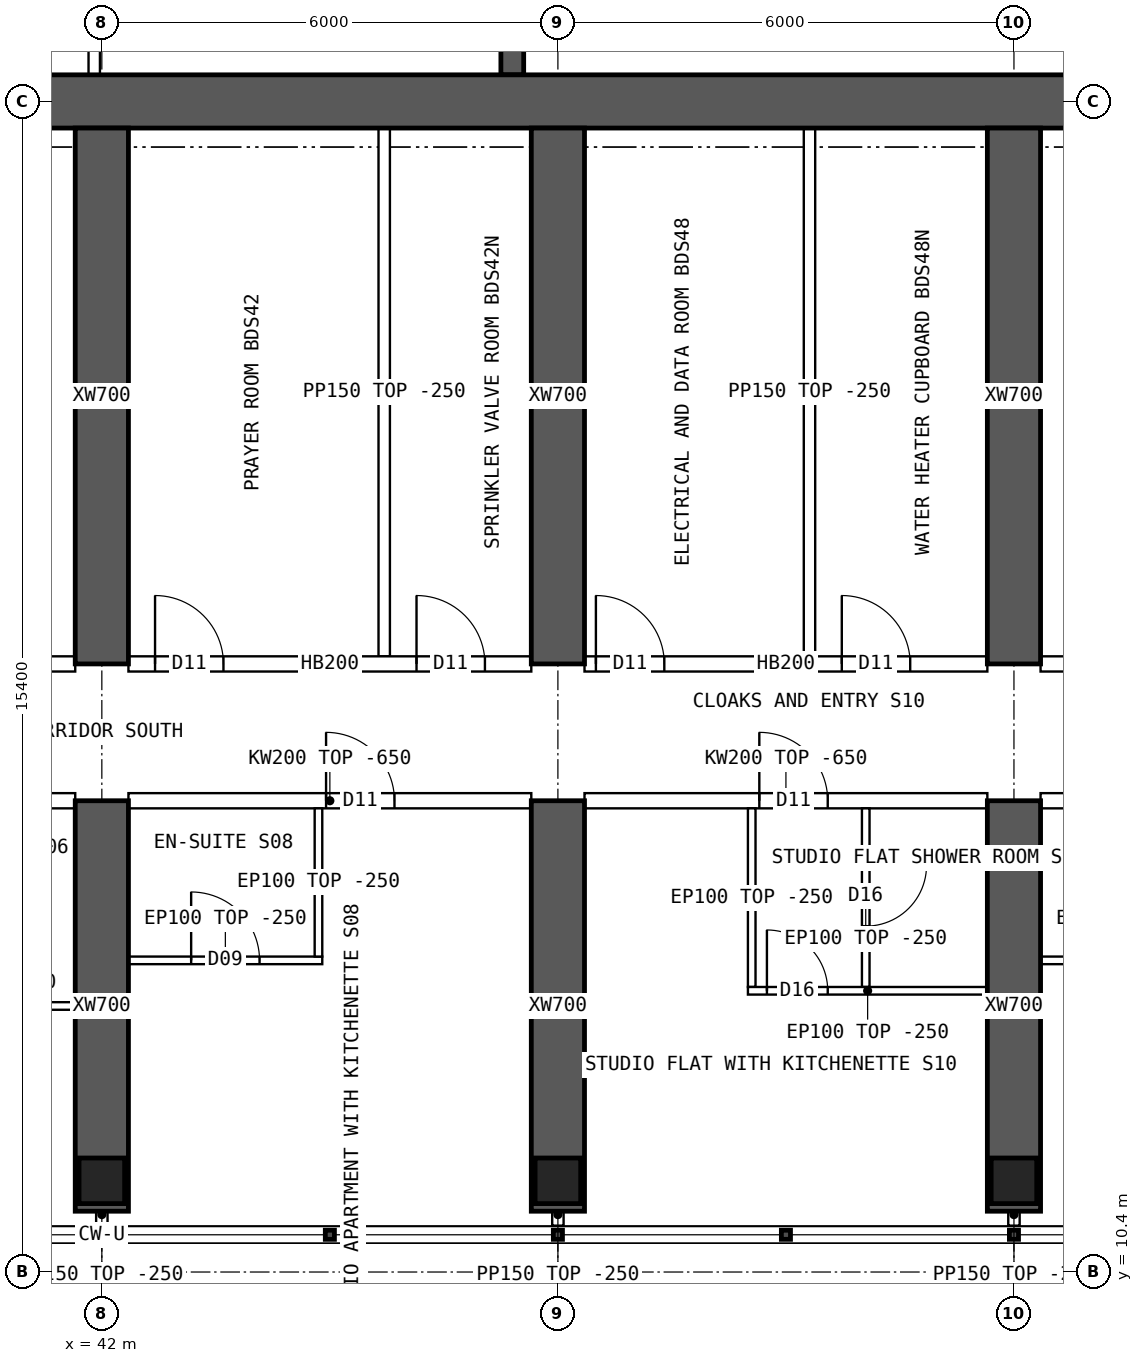
"""IFC4 building model, lengths in metres.
Left out: names, types, materials, properties, quantities, classifications, styles, units other than length and angle.
Written with IfcOpenShell. Run it as: python <this file> out.ifc"""

import sys

from ifc_helpers import new_model, si_unit, direction, frame, frame_2d, origin, origin_2d, place, context, subcontext, project, spatial, polyline, rectangle, hollow_rectangle, outline, extrude, element, fill, save


model = new_model("IFC4")
c1 = context("Model", 3, precision=1e-05, world=origin(), true_north=direction((0.0, 1.0)))
c2 = subcontext(c1, "Body", "Model", "MODEL_VIEW")
j1 = project(units=[si_unit("LENGTHUNIT", "METRE"), si_unit("PLANEANGLEUNIT", "RADIAN")], contexts=[c1])
p1 = place(None, origin())
s1 = spatial("IfcSite", under=j1, at=p1, CompositionType="ELEMENT")
p2 = place(p1, origin())
s2 = spatial("IfcBuilding", under=s1, at=p2, CompositionType="ELEMENT")
p3 = place(p2, frame((0.0, 0.0, 231.55)))
s3 = spatial("IfcBuildingStorey", under=s2, at=p3, CompositionType="ELEMENT", Elevation=231.55)
for number, where, z_axis, x_axis in (
    (1, (42.0, 11.6, 0.0), (0.0, 0.0, 1.0), (1.0, 0.0, 0.0)),
    (2, (48.0, 11.6, 0.0), (0.0, 0.0, 1.0), (1.0, 0.0, 0.0)),
    (3, (54.0, 11.6, 0.0), (0.0, 0.0, 1.0), (1.0, 0.0, 0.0)),
):
    element("IfcColumn", number, at=place(p3, frame(where, z_axis=z_axis, x_axis=x_axis)), inside=s3, PredefinedType="COLUMN", context=c2, shape_type="SweptSolid", body=[
        extrude(hollow_rectangle(XDim=0.6, YDim=0.6, WallThickness=0.06, at=origin_2d()), origin(), (0.0, 0.0, 1.0), 3.75),
    ])
p4 = place(p3, frame((18.0, 25.8, 0.0), z_axis=(0.0, 0.0, 1.0), x_axis=(1.0, 0.0, 0.0)))
e4 = element("IfcWall", 4, at=p4, inside=s3, PredefinedType="SHEAR", context=c2, shape_type="SweptSolid", body=[
    extrude(rectangle(XDim=48.0, YDim=0.7, at=frame_2d((24.0, 0.0))), origin(), (0.0, 0.0, 1.0), 3.75),
])
p5 = place(p3, frame((47.4, 26.15, 0.0), z_axis=(0.0, 0.0, 1.0), x_axis=(0.0, 1.0, 0.0)))
e5 = element("IfcWall", 5, at=p5, inside=s3, PredefinedType="SHEAR", context=c2, shape_type="SweptSolid", body=[
    extrude(rectangle(XDim=4.1, YDim=0.3, at=frame_2d((2.05, 0.0))), origin(), (0.0, 0.0, 1.0), 3.75),
])
p6 = place(p3, frame((42.0, 11.2, 0.0), z_axis=(0.0, 0.0, 1.0), x_axis=(0.0, 1.0, 0.0)))
e6 = element("IfcWall", 6, at=p6, inside=s3, PredefinedType="SHEAR", context=c2, shape_type="SweptSolid", body=[
    extrude(rectangle(XDim=5.4, YDim=0.7, at=frame_2d((2.7, 0.0))), origin(), (0.0, 0.0, 1.0), 3.75),
])
p7 = place(p3, frame((42.0, 18.4, 0.0), z_axis=(0.0, 0.0, 1.0), x_axis=(0.0, 1.0, 0.0)))
e7 = element("IfcWall", 7, at=p7, inside=s3, PredefinedType="SHEAR", context=c2, shape_type="SweptSolid", body=[
    extrude(rectangle(XDim=7.05, YDim=0.7, at=frame_2d((3.525, 0.0))), origin(), (0.0, 0.0, 1.0), 3.75),
])
p8 = place(p3, frame((48.0, 11.2, 0.0), z_axis=(0.0, 0.0, 1.0), x_axis=(0.0, 1.0, 0.0)))
e8 = element("IfcWall", 8, at=p8, inside=s3, PredefinedType="SHEAR", context=c2, shape_type="SweptSolid", body=[
    extrude(rectangle(XDim=5.4, YDim=0.7, at=frame_2d((2.7, 0.0))), origin(), (0.0, 0.0, 1.0), 3.75),
])
p9 = place(p3, frame((48.0, 18.4, 0.0), z_axis=(0.0, 0.0, 1.0), x_axis=(0.0, 1.0, 0.0)))
e9 = element("IfcWall", 9, at=p9, inside=s3, PredefinedType="SHEAR", context=c2, shape_type="SweptSolid", body=[
    extrude(rectangle(XDim=7.05, YDim=0.7, at=frame_2d((3.525, 0.0))), origin(), (0.0, 0.0, 1.0), 3.75),
])
p10 = place(p3, frame((54.0, 11.2, 0.0), z_axis=(0.0, 0.0, 1.0), x_axis=(0.0, 1.0, 0.0)))
e10 = element("IfcWall", 10, at=p10, inside=s3, PredefinedType="SHEAR", context=c2, shape_type="SweptSolid", body=[
    extrude(rectangle(XDim=5.4, YDim=0.7, at=frame_2d((2.7, 0.0))), origin(), (0.0, 0.0, 1.0), 3.75),
])
p11 = place(p3, frame((54.0, 18.4, 0.0), z_axis=(0.0, 0.0, 1.0), x_axis=(0.0, 1.0, 0.0)))
e11 = element("IfcWall", 11, at=p11, inside=s3, PredefinedType="SHEAR", context=c2, shape_type="SweptSolid", body=[
    extrude(rectangle(XDim=7.05, YDim=0.7, at=frame_2d((3.525, 0.0))), origin(), (0.0, 0.0, 1.0), 3.75),
])
p12 = place(p3, frame((41.9, 26.15, 0.0), z_axis=(0.0, 0.0, 1.0), x_axis=(0.0, 1.0, 0.0)))
e12 = element("IfcWall", 12, at=p12, inside=s3, PredefinedType="SOLIDWALL", context=c2, shape_type="SweptSolid", body=[
    extrude(rectangle(XDim=4.1, YDim=0.15, at=frame_2d((2.05, 0.0))), origin(), (0.0, 0.0, 1.0), 3.5),
])
p13 = place(p3, frame((36.35, 16.6, 0.0), z_axis=(0.0, 0.0, 1.0), x_axis=(1.0, 0.0, 0.0)))
e13 = element("IfcWall", 13, at=p13, inside=s3, PredefinedType="SOLIDWALL", context=c2, shape_type="SweptSolid", body=[
    extrude(outline(polyline([(0.0, 0.0), (5.3, 0.0), (5.3, 3.1), (0.0, 3.1), (0.0, 0.0)])), frame((0.0, 0.1, 0.0), z_axis=(0.0, -1.0, 0.0), x_axis=(1.0, 0.0, 0.0)), (0.0, 0.0, 1.0), 0.2),
])
p14 = place(p13, frame((0.3, 0.0, 0.0)))
e14 = element("IfcOpeningElement", 14, at=p14, cuts=e13, PredefinedType="OPENING", context=c2, shape_type="SweptSolid", body=[
    extrude(rectangle(XDim=1.0, YDim=2.1, at=frame_2d((0.5, 1.05))), frame((0.0, 0.11, 0.0), z_axis=(0.0, -1.0, 0.0), x_axis=(1.0, 0.0, 0.0)), (0.0, 0.0, 1.0), 0.22),
])
p15 = place(p3, frame((36.35, 18.4, 0.0), z_axis=(0.0, 0.0, 1.0), x_axis=(1.0, 0.0, 0.0)))
e15 = element("IfcWall", 15, at=p15, inside=s3, PredefinedType="SOLIDWALL", context=c2, shape_type="SweptSolid", body=[
    extrude(rectangle(XDim=5.3, YDim=0.2, at=frame_2d((2.65, 0.0))), origin(), (0.0, 0.0, 1.0), 3.5),
])
p16 = place(p15, frame((0.525, 0.0, 0.0)))
e16 = element("IfcOpeningElement", 16, at=p16, cuts=e15, PredefinedType="OPENING", context=c2, shape_type="SweptSolid", body=[
    extrude(rectangle(XDim=1.0, YDim=2.1, at=frame_2d((0.5, 1.05))), frame((0.0, 0.11, 0.0), z_axis=(0.0, -1.0, 0.0), x_axis=(1.0, 0.0, 0.0)), (0.0, 0.0, 1.0), 0.22),
])
p17 = place(p3, frame((42.35, 16.6, 0.0), z_axis=(0.0, 0.0, 1.0), x_axis=(1.0, 0.0, 0.0)))
e17 = element("IfcWall", 17, at=p17, inside=s3, PredefinedType="SOLIDWALL", context=c2, shape_type="SweptSolid", body=[
    extrude(outline(polyline([(0.0, 0.0), (5.3, 0.0), (5.3, 3.1), (0.0, 3.1), (0.0, 0.0)])), frame((0.0, 0.1, 0.0), z_axis=(0.0, -1.0, 0.0), x_axis=(1.0, 0.0, 0.0)), (0.0, 0.0, 1.0), 0.2),
])
p18 = place(p17, frame((2.6, 0.0, 0.0)))
e18 = element("IfcOpeningElement", 18, at=p18, cuts=e17, PredefinedType="OPENING", context=c2, shape_type="SweptSolid", body=[
    extrude(rectangle(XDim=0.9, YDim=2.1, at=frame_2d((0.45, 1.05))), frame((0.0, 0.11, 0.0), z_axis=(0.0, -1.0, 0.0), x_axis=(1.0, 0.0, 0.0)), (0.0, 0.0, 1.0), 0.22),
])
p19 = place(p3, frame((42.35, 18.4, 0.0), z_axis=(0.0, 0.0, 1.0), x_axis=(1.0, 0.0, 0.0)))
e19 = element("IfcWall", 19, at=p19, inside=s3, PredefinedType="SOLIDWALL", context=c2, shape_type="SweptSolid", body=[
    extrude(rectangle(XDim=5.3, YDim=0.2, at=frame_2d((2.65, 0.0))), origin(), (0.0, 0.0, 1.0), 3.5),
])
p20 = place(p19, frame((0.35, 0.0, 0.0)))
e20 = element("IfcOpeningElement", 20, at=p20, cuts=e19, PredefinedType="OPENING", context=c2, shape_type="SweptSolid", body=[
    extrude(rectangle(XDim=0.9, YDim=2.1, at=frame_2d((0.45, 1.05))), frame((0.0, 0.11, 0.0), z_axis=(0.0, -1.0, 0.0), x_axis=(1.0, 0.0, 0.0)), (0.0, 0.0, 1.0), 0.22),
])
p21 = place(p19, frame((3.79, 0.0, 0.0)))
e21 = element("IfcOpeningElement", 21, at=p21, cuts=e19, PredefinedType="OPENING", context=c2, shape_type="SweptSolid", body=[
    extrude(rectangle(XDim=0.9, YDim=2.1, at=frame_2d((0.45, 1.05))), frame((0.0, 0.11, 0.0), z_axis=(0.0, -1.0, 0.0), x_axis=(1.0, 0.0, 0.0)), (0.0, 0.0, 1.0), 0.22),
])
p22 = place(p3, frame((48.35, 16.6, 0.0), z_axis=(0.0, 0.0, 1.0), x_axis=(1.0, 0.0, 0.0)))
e22 = element("IfcWall", 22, at=p22, inside=s3, PredefinedType="SOLIDWALL", context=c2, shape_type="SweptSolid", body=[
    extrude(outline(polyline([(0.0, 0.0), (5.3, 0.0), (5.3, 3.1), (0.0, 3.1), (0.0, 0.0)])), frame((0.0, 0.1, 0.0), z_axis=(0.0, -1.0, 0.0), x_axis=(1.0, 0.0, 0.0)), (0.0, 0.0, 1.0), 0.2),
])
p23 = place(p22, frame((2.3, 0.0, 0.0)))
e23 = element("IfcOpeningElement", 23, at=p23, cuts=e22, PredefinedType="OPENING", context=c2, shape_type="SweptSolid", body=[
    extrude(rectangle(XDim=0.9, YDim=2.1, at=frame_2d((0.45, 1.05))), frame((0.0, 0.11, 0.0), z_axis=(0.0, -1.0, 0.0), x_axis=(1.0, 0.0, 0.0)), (0.0, 0.0, 1.0), 0.22),
])
p24 = place(p3, frame((48.35, 18.4, 0.0), z_axis=(0.0, 0.0, 1.0), x_axis=(1.0, 0.0, 0.0)))
e24 = element("IfcWall", 24, at=p24, inside=s3, PredefinedType="SOLIDWALL", context=c2, shape_type="SweptSolid", body=[
    extrude(rectangle(XDim=5.3, YDim=0.2, at=frame_2d((2.65, 0.0))), origin(), (0.0, 0.0, 1.0), 3.5),
])
p25 = place(p24, frame((0.15, 0.0, 0.0)))
e25 = element("IfcOpeningElement", 25, at=p25, cuts=e24, PredefinedType="OPENING", context=c2, shape_type="SweptSolid", body=[
    extrude(rectangle(XDim=0.9, YDim=2.1, at=frame_2d((0.45, 1.05))), frame((0.0, 0.11, 0.0), z_axis=(0.0, -1.0, 0.0), x_axis=(1.0, 0.0, 0.0)), (0.0, 0.0, 1.0), 0.22),
])
p26 = place(p24, frame((3.385, 0.0, 0.0)))
e26 = element("IfcOpeningElement", 26, at=p26, cuts=e24, PredefinedType="OPENING", context=c2, shape_type="SweptSolid", body=[
    extrude(rectangle(XDim=0.9, YDim=2.1, at=frame_2d((0.45, 1.05))), frame((0.0, 0.11, 0.0), z_axis=(0.0, -1.0, 0.0), x_axis=(1.0, 0.0, 0.0)), (0.0, 0.0, 1.0), 0.22),
])
p27 = place(p3, frame((54.35, 16.6, 0.0), z_axis=(0.0, 0.0, 1.0), x_axis=(1.0, 0.0, 0.0)))
e27 = element("IfcWall", 27, at=p27, inside=s3, PredefinedType="SOLIDWALL", context=c2, shape_type="SweptSolid", body=[
    extrude(outline(polyline([(0.0, 0.0), (5.3, 0.0), (5.3, 3.1), (0.0, 3.1), (0.0, 0.0)])), frame((0.0, 0.1, 0.0), z_axis=(0.0, -1.0, 0.0), x_axis=(1.0, 0.0, 0.0)), (0.0, 0.0, 1.0), 0.2),
])
p28 = place(p27, frame((2.6, 0.0, 0.0)))
e28 = element("IfcOpeningElement", 28, at=p28, cuts=e27, PredefinedType="OPENING", context=c2, shape_type="SweptSolid", body=[
    extrude(rectangle(XDim=0.9, YDim=2.1, at=frame_2d((0.45, 1.05))), frame((0.0, 0.11, 0.0), z_axis=(0.0, -1.0, 0.0), x_axis=(1.0, 0.0, 0.0)), (0.0, 0.0, 1.0), 0.22),
])
p29 = place(p3, frame((54.35, 18.4, 0.0), z_axis=(0.0, 0.0, 1.0), x_axis=(1.0, 0.0, 0.0)))
e29 = element("IfcWall", 29, at=p29, inside=s3, PredefinedType="SOLIDWALL", context=c2, shape_type="SweptSolid", body=[
    extrude(rectangle(XDim=5.3, YDim=0.2, at=frame_2d((2.65, 0.0))), origin(), (0.0, 0.0, 1.0), 3.5),
])
p30 = place(p29, frame((0.8, 0.0, 0.0)))
e30 = element("IfcOpeningElement", 30, at=p30, cuts=e29, PredefinedType="OPENING", context=c2, shape_type="SweptSolid", body=[
    extrude(rectangle(XDim=1.0, YDim=2.1, at=frame_2d((0.5, 1.05))), frame((0.0, 0.11, 0.0), z_axis=(0.0, -1.0, 0.0), x_axis=(1.0, 0.0, 0.0)), (0.0, 0.0, 1.0), 0.22),
])
p31 = place(p3, frame((39.0, 13.9, 0.0), z_axis=(0.0, 0.0, 1.0), x_axis=(1.0, 0.0, 0.0)))
e31 = element("IfcWall", 31, at=p31, inside=s3, PredefinedType="PARTITIONING", context=c2, shape_type="SweptSolid", body=[
    extrude(rectangle(XDim=2.65, YDim=0.1, at=frame_2d((1.325, 0.0))), origin(), (0.0, 0.0, 1.0), 3.5),
])
p32 = place(p3, frame((44.9, 14.5, 0.0), z_axis=(0.0, 0.0, 1.0), x_axis=(-1.0, 0.0, 0.0)))
e32 = element("IfcWall", 32, at=p32, inside=s3, PredefinedType="PARTITIONING", context=c2, shape_type="SweptSolid", body=[
    extrude(rectangle(XDim=2.55, YDim=0.1, at=frame_2d((1.275, 0.0))), origin(), (0.0, 0.0, 1.0), 3.5),
])
p33 = place(p32, frame((0.825, 0.0, 0.0)))
e33 = element("IfcOpeningElement", 33, at=p33, cuts=e32, PredefinedType="OPENING", context=c2, shape_type="SweptSolid", body=[
    extrude(rectangle(XDim=0.9, YDim=2.1, at=frame_2d((0.45, 1.05))), frame((0.0, 0.06, 0.0), z_axis=(0.0, -1.0, 0.0), x_axis=(1.0, 0.0, 0.0)), (0.0, 0.0, 1.0), 0.12),
])
p34 = place(p3, frame((44.85, 14.55, 0.0), z_axis=(0.0, 0.0, 1.0), x_axis=(0.0, 1.0, 0.0)))
e34 = element("IfcWall", 34, at=p34, inside=s3, PredefinedType="PARTITIONING", context=c2, shape_type="SweptSolid", body=[
    extrude(outline(polyline([(0.0, 0.0), (1.95, 0.0), (1.95, 3.1), (1.902, 3.1), (1.9, 3.5), (0.0, 3.5), (0.0, 0.0)])), frame((0.0, 0.05, 0.0), z_axis=(0.0, -1.0, 0.0), x_axis=(1.0, 0.0, 0.0)), (0.0, 0.0, 1.0), 0.1),
])
p35 = place(p3, frame((53.65, 14.1, 0.0), z_axis=(0.0, 0.0, 1.0), x_axis=(-1.0, 0.0, 0.0)))
e35 = element("IfcWall", 35, at=p35, inside=s3, PredefinedType="PARTITIONING", context=c2, shape_type="SweptSolid", body=[
    extrude(rectangle(XDim=3.15, YDim=0.1, at=frame_2d((1.575, 0.0))), origin(), (0.0, 0.0, 1.0), 3.5),
])
p36 = place(p35, frame((2.1, 0.0, 0.0)))
e36 = element("IfcOpeningElement", 36, at=p36, cuts=e35, PredefinedType="OPENING", context=c2, shape_type="SweptSolid", body=[
    extrude(rectangle(XDim=0.8, YDim=2.1, at=frame_2d((0.4, 1.05))), frame((0.0, 0.06, 0.0), z_axis=(0.0, -1.0, 0.0), x_axis=(1.0, 0.0, 0.0)), (0.0, 0.0, 1.0), 0.12),
])
p37 = place(p3, frame((50.55, 14.15, 0.0), z_axis=(0.0, 0.0, 1.0), x_axis=(0.0, 1.0, 0.0)))
e37 = element("IfcWall", 37, at=p37, inside=s3, PredefinedType="PARTITIONING", context=c2, shape_type="SweptSolid", body=[
    extrude(outline(polyline([(0.0, 0.0), (2.35, 0.0), (2.35, 3.1), (2.302, 3.1), (2.3, 3.5), (0.0, 3.5), (0.0, 0.0)])), frame((0.0, 0.05, 0.0), z_axis=(0.0, -1.0, 0.0), x_axis=(1.0, 0.0, 0.0)), (0.0, 0.0, 1.0), 0.1),
])
p38 = place(p3, frame((52.05, 14.15, 0.0), z_axis=(0.0, 0.0, 1.0), x_axis=(0.0, 1.0, 0.0)))
e38 = element("IfcWall", 38, at=p38, inside=s3, PredefinedType="PARTITIONING", context=c2, shape_type="SweptSolid", body=[
    extrude(outline(polyline([(0.0, 0.0), (2.35, 0.0), (2.35, 3.1), (2.302, 3.1), (2.3, 3.5), (0.0, 3.5), (0.0, 0.0)])), frame((0.0, 0.05, 0.0), z_axis=(0.0, -1.0, 0.0), x_axis=(1.0, 0.0, 0.0)), (0.0, 0.0, 1.0), 0.1),
])
p39 = place(p38, frame((0.8, 0.0, 0.0)))
e39 = element("IfcOpeningElement", 39, at=p39, cuts=e38, PredefinedType="OPENING", context=c2, shape_type="SweptSolid", body=[
    extrude(rectangle(XDim=0.8, YDim=2.1, at=frame_2d((0.4, 1.05))), frame((0.0, 0.06, 0.0), z_axis=(0.0, -1.0, 0.0), x_axis=(1.0, 0.0, 0.0)), (0.0, 0.0, 1.0), 0.12),
])
p40 = place(p3, frame((56.9, 14.5, 0.0), z_axis=(0.0, 0.0, 1.0), x_axis=(-1.0, 0.0, 0.0)))
e40 = element("IfcWall", 40, at=p40, inside=s3, PredefinedType="PARTITIONING", context=c2, shape_type="SweptSolid", body=[
    extrude(rectangle(XDim=2.55, YDim=0.1, at=frame_2d((1.275, 0.0))), origin(), (0.0, 0.0, 1.0), 3.5),
])
p41 = place(p40, frame((0.825, 0.0, 0.0)))
e41 = element("IfcOpeningElement", 41, at=p41, cuts=e40, PredefinedType="OPENING", context=c2, shape_type="SweptSolid", body=[
    extrude(rectangle(XDim=0.9, YDim=2.1, at=frame_2d((0.45, 1.05))), frame((0.0, 0.06, 0.0), z_axis=(0.0, -1.0, 0.0), x_axis=(1.0, 0.0, 0.0)), (0.0, 0.0, 1.0), 0.12),
])
for number, where, z_axis, x_axis in (
    (42, (45.715, 18.5, 0.0), (0.0, 0.0, 1.0), (0.0, 1.0, 0.0)),
    (43, (51.31, 18.5, 0.0), (0.0, 0.0, 1.0), (0.0, 1.0, 0.0)),
):
    element("IfcWall", number, at=place(p3, frame(where, z_axis=z_axis, x_axis=x_axis)), inside=s3, PredefinedType="PARTITIONING", context=c2, shape_type="SweptSolid", body=[
        extrude(rectangle(XDim=6.95, YDim=0.15, at=frame_2d((3.475, 0.0))), origin(), (0.0, 0.0, 1.0), 3.5),
    ])
for number, where, z_axis, x_axis in (
    (44, (42.0, 11.3, 0.0), (0.0, 0.0, 1.0), (0.0, -1.0, 0.0)),
    (45, (48.0, 11.3, 0.0), (0.0, 0.0, 1.0), (0.0, -1.0, 0.0)),
    (46, (54.0, 11.3, 0.0), (0.0, 0.0, 1.0), (0.0, -1.0, 0.0)),
):
    element("IfcWall", number, at=place(p3, frame(where, z_axis=z_axis, x_axis=x_axis)), inside=s3, PredefinedType="PARTITIONING", context=c2, shape_type="SweptSolid", body=[
        extrude(rectangle(XDim=0.29, YDim=0.15, at=frame_2d((0.145, 0.0))), origin(), (0.0, 0.0, 1.0), 3.5),
    ])
p42 = place(p33, origin())
e47 = element("IfcDoor", 47, at=p42, inside=s3, OperationType="SINGLE_SWING_RIGHT", PredefinedType="DOOR", context=c2, shape_type="SweptSolid", body=[
    extrude(rectangle(XDim=0.9, YDim=2.1, at=frame_2d((0.45, 1.05))), frame((0.0, 0.025, 0.0), z_axis=(0.0, -1.0, 0.0), x_axis=(1.0, 0.0, 0.0)), (0.0, 0.0, 1.0), 0.05),
])
fill(e33, e47)
p43 = place(p18, origin())
e48 = element("IfcDoor", 48, at=p43, inside=s3, OperationType="SINGLE_SWING_LEFT", PredefinedType="DOOR", context=c2, shape_type="SweptSolid", body=[
    extrude(rectangle(XDim=0.9, YDim=2.1, at=frame_2d((0.45, 1.05))), frame((0.0, 0.025, 0.0), z_axis=(0.0, -1.0, 0.0), x_axis=(1.0, 0.0, 0.0)), (0.0, 0.0, 1.0), 0.05),
])
fill(e18, e48)
p44 = place(p36, origin())
e49 = element("IfcDoor", 49, at=p44, inside=s3, OperationType="SINGLE_SWING_RIGHT", PredefinedType="DOOR", context=c2, shape_type="SweptSolid", body=[
    extrude(rectangle(XDim=0.8, YDim=2.1, at=frame_2d((0.4, 1.05))), frame((0.0, 0.025, 0.0), z_axis=(0.0, -1.0, 0.0), x_axis=(1.0, 0.0, 0.0)), (0.0, 0.0, 1.0), 0.05),
])
fill(e36, e49)
p45 = place(p39, origin())
e50 = element("IfcDoor", 50, at=p45, inside=s3, OperationType="SINGLE_SWING_RIGHT", PredefinedType="DOOR", context=c2, shape_type="SweptSolid", body=[
    extrude(rectangle(XDim=0.8, YDim=2.1, at=frame_2d((0.4, 1.05))), frame((0.0, 0.025, 0.0), z_axis=(0.0, -1.0, 0.0), x_axis=(1.0, 0.0, 0.0)), (0.0, 0.0, 1.0), 0.05),
])
fill(e39, e50)
p46 = place(p23, origin())
e51 = element("IfcDoor", 51, at=p46, inside=s3, OperationType="SINGLE_SWING_LEFT", PredefinedType="DOOR", context=c2, shape_type="SweptSolid", body=[
    extrude(rectangle(XDim=0.9, YDim=2.1, at=frame_2d((0.45, 1.05))), frame((0.0, 0.025, 0.0), z_axis=(0.0, -1.0, 0.0), x_axis=(1.0, 0.0, 0.0)), (0.0, 0.0, 1.0), 0.05),
])
fill(e23, e51)
p47 = place(p20, origin())
e52 = element("IfcDoor", 52, at=p47, inside=s3, OperationType="SINGLE_SWING_LEFT", PredefinedType="DOOR", context=c2, shape_type="SweptSolid", body=[
    extrude(rectangle(XDim=0.9, YDim=2.1, at=frame_2d((0.45, 1.05))), frame((0.0, 0.025, 0.0), z_axis=(0.0, -1.0, 0.0), x_axis=(1.0, 0.0, 0.0)), (0.0, 0.0, 1.0), 0.05),
])
fill(e20, e52)
p48 = place(p21, origin())
e53 = element("IfcDoor", 53, at=p48, inside=s3, OperationType="SINGLE_SWING_LEFT", PredefinedType="DOOR", context=c2, shape_type="SweptSolid", body=[
    extrude(rectangle(XDim=0.9, YDim=2.1, at=frame_2d((0.45, 1.05))), frame((0.0, 0.025, 0.0), z_axis=(0.0, -1.0, 0.0), x_axis=(1.0, 0.0, 0.0)), (0.0, 0.0, 1.0), 0.05),
])
fill(e21, e53)
p49 = place(p25, origin())
e54 = element("IfcDoor", 54, at=p49, inside=s3, OperationType="SINGLE_SWING_LEFT", PredefinedType="DOOR", context=c2, shape_type="SweptSolid", body=[
    extrude(rectangle(XDim=0.9, YDim=2.1, at=frame_2d((0.45, 1.05))), frame((0.0, 0.025, 0.0), z_axis=(0.0, -1.0, 0.0), x_axis=(1.0, 0.0, 0.0)), (0.0, 0.0, 1.0), 0.05),
])
fill(e25, e54)
p50 = place(p26, origin())
e55 = element("IfcDoor", 55, at=p50, inside=s3, OperationType="SINGLE_SWING_LEFT", PredefinedType="DOOR", context=c2, shape_type="SweptSolid", body=[
    extrude(rectangle(XDim=0.9, YDim=2.1, at=frame_2d((0.45, 1.05))), frame((0.0, 0.025, 0.0), z_axis=(0.0, -1.0, 0.0), x_axis=(1.0, 0.0, 0.0)), (0.0, 0.0, 1.0), 0.05),
])
fill(e26, e55)
save(model, sys.argv[1])
